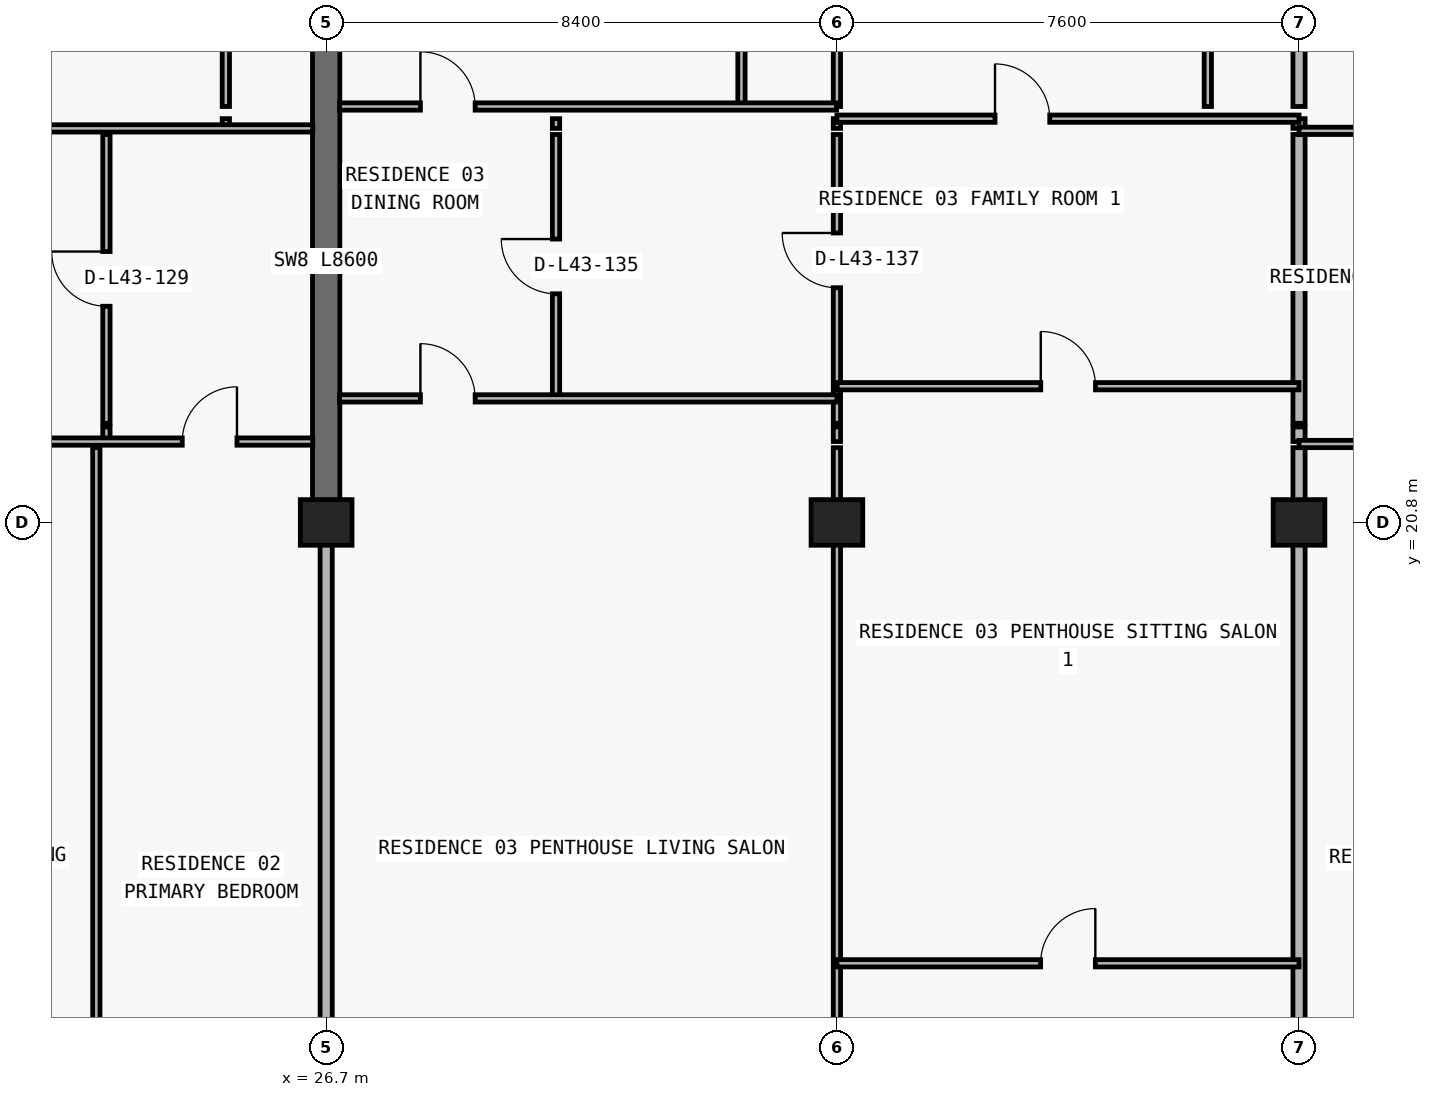
"""IFC4 building model, lengths in metres.
Left out: names, types, materials, properties, quantities, classifications, styles, units other than length and angle.
Written with IfcOpenShell. Run it as: python <this file> out.ifc"""

import sys

from ifc_helpers import new_model, si_unit, direction, frame, frame_2d, origin, origin_2d, place, context, subcontext, project, spatial, rectangle, extrude, element, fill, save


model = new_model("IFC4")
c1 = context("Model", 3, precision=1e-05, world=origin(), true_north=direction((0.0, 1.0)))
c2 = subcontext(c1, "Body", "Model", "MODEL_VIEW")
j1 = project(units=[si_unit("LENGTHUNIT", "METRE"), si_unit("PLANEANGLEUNIT", "RADIAN")], contexts=[c1])
p1 = place(None, origin())
s1 = spatial("IfcSite", under=j1, at=p1, CompositionType="ELEMENT")
p2 = place(p1, origin())
s2 = spatial("IfcBuilding", under=s1, at=p2, CompositionType="ELEMENT")
p3 = place(p2, frame((0.0, 0.0, 157.2)))
s3 = spatial("IfcBuildingStorey", under=s2, at=p3, CompositionType="ELEMENT", Elevation=157.2)
for number, where, z_axis, x_axis in (
    (1, (26.7, 20.8, 0.0), (0.0, 0.0, 1.0), (1.0, 0.0, 0.0)),
    (2, (35.1, 20.8, 0.0), (0.0, 0.0, 1.0), (1.0, 0.0, 0.0)),
    (3, (42.7, 20.8, 0.0), (0.0, 0.0, 1.0), (1.0, 0.0, 0.0)),
):
    element("IfcColumn", number, at=place(p3, frame(where, z_axis=z_axis, x_axis=x_axis)), inside=s3, PredefinedType="COLUMN", context=c2, shape_type="SweptSolid", body=[
        extrude(rectangle(XDim=0.85, YDim=0.75, at=origin_2d()), origin(), (0.0, 0.0, 1.0), 3.05),
    ])
p4 = place(p3, frame((26.7, 20.8, 0.0), z_axis=(0.0, 0.0, 1.0), x_axis=(0.0, 1.0, 0.0)))
e4 = element("IfcWall", 4, at=p4, inside=s3, PredefinedType="SHEAR", context=c2, shape_type="SweptSolid", body=[
    extrude(rectangle(XDim=8.6, YDim=0.45, at=frame_2d((4.3, 0.0))), origin(), (0.0, 0.0, 1.0), 3.05),
])
p5 = place(p3, frame((22.92, 11.24, 0.0), z_axis=(0.0, 0.0, 1.0), x_axis=(0.0, 1.0, 0.0)))
e5 = element("IfcWall", 5, at=p5, inside=s3, PredefinedType="PARTITIONING", context=c2, shape_type="SweptSolid", body=[
    extrude(rectangle(XDim=10.79, YDim=0.12, at=frame_2d((5.395, 0.0))), origin(), (0.0, 0.0, 1.0), 3.05),
])
p6 = place(p3, frame((23.086, 22.13, 0.0), z_axis=(0.0, 0.0, 1.0), x_axis=(0.0, 1.0, 0.0)))
e6 = element("IfcWall", 6, at=p6, inside=s3, PredefinedType="PARTITIONING", context=c2, shape_type="SweptSolid", body=[
    extrude(rectangle(XDim=0.24, YDim=0.12, at=frame_2d((0.12, 0.0))), origin(), (0.0, 0.0, 1.0), 3.05),
])
p7 = place(p3, frame((23.086, 22.43, 0.0), z_axis=(0.0, 0.0, 1.0), x_axis=(0.0, 1.0, 0.0)))
e7 = element("IfcWall", 7, at=p7, inside=s3, PredefinedType="PARTITIONING", context=c2, shape_type="SweptSolid", body=[
    extrude(rectangle(XDim=4.75, YDim=0.12, at=frame_2d((2.375, 0.0))), origin(), (0.0, 0.0, 1.0), 3.05),
])
p8 = place(p7, frame((1.925, 0.0, 0.0)))
e8 = element("IfcOpeningElement", 8, at=p8, cuts=e7, PredefinedType="OPENING", context=c2, shape_type="SweptSolid", body=[
    extrude(rectangle(XDim=0.9, YDim=2.15, at=frame_2d((0.45, 1.075))), frame((0.0, 0.07, 0.0), z_axis=(0.0, -1.0, 0.0), x_axis=(1.0, 0.0, 0.0)), (0.0, 0.0, 1.0), 0.14),
])
p9 = place(p3, frame((25.05, 27.28, 0.0), z_axis=(0.0, 0.0, 1.0), x_axis=(0.0, 1.0, 0.0)))
e9 = element("IfcWall", 9, at=p9, inside=s3, PredefinedType="PARTITIONING", context=c2, shape_type="SweptSolid", body=[
    extrude(rectangle(XDim=0.16, YDim=0.12, at=frame_2d((0.08, 0.0))), origin(), (0.0, 0.0, 1.0), 3.05),
])
p10 = place(p3, frame((25.05, 27.64, 0.0), z_axis=(0.0, 0.0, 1.0), x_axis=(0.0, 1.0, 0.0)))
e10 = element("IfcWall", 10, at=p10, inside=s3, PredefinedType="PARTITIONING", context=c2, shape_type="SweptSolid", body=[
    extrude(rectangle(XDim=6.56, YDim=0.12, at=frame_2d((3.28, 0.0))), origin(), (0.0, 0.0, 1.0), 3.05),
])
p11 = place(p10, frame((2.855, 0.0, 0.0)))
e11 = element("IfcOpeningElement", 11, at=p11, cuts=e10, PredefinedType="OPENING", context=c2, shape_type="SweptSolid", body=[
    extrude(rectangle(XDim=0.85, YDim=2.1, at=frame_2d((0.425, 1.05))), frame((0.0, 0.07, 0.0), z_axis=(0.0, -1.0, 0.0), x_axis=(1.0, 0.0, 0.0)), (0.0, 0.0, 1.0), 0.14),
])
p12 = place(p3, frame((26.7, 11.24, 0.0), z_axis=(0.0, 0.0, 1.0), x_axis=(0.0, 1.0, 0.0)))
e12 = element("IfcWall", 12, at=p12, inside=s3, PredefinedType="PARTITIONING", context=c2, shape_type="SweptSolid", body=[
    extrude(rectangle(XDim=9.555, YDim=0.2, at=frame_2d((4.777, 0.0))), origin(), (0.0, 0.0, 1.0), 2.263),
])
p13 = place(p3, frame((30.48, 22.84, 0.0), z_axis=(0.0, 0.0, 1.0), x_axis=(0.0, 1.0, 0.0)))
e13 = element("IfcWall", 13, at=p13, inside=s3, PredefinedType="PARTITIONING", context=c2, shape_type="SweptSolid", body=[
    extrude(rectangle(XDim=4.34, YDim=0.12, at=frame_2d((2.17, 0.0))), origin(), (0.0, 0.0, 1.0), 3.05),
])
p14 = place(p13, frame((1.72, 0.0, 0.0)))
e14 = element("IfcOpeningElement", 14, at=p14, cuts=e13, PredefinedType="OPENING", context=c2, shape_type="SweptSolid", body=[
    extrude(rectangle(XDim=0.9, YDim=2.15, at=frame_2d((0.45, 1.075))), frame((0.0, 0.07, 0.0), z_axis=(0.0, -1.0, 0.0), x_axis=(1.0, 0.0, 0.0)), (0.0, 0.0, 1.0), 0.14),
])
p15 = place(p3, frame((30.48, 27.28, 0.0), z_axis=(0.0, 0.0, 1.0), x_axis=(0.0, 1.0, 0.0)))
e15 = element("IfcWall", 15, at=p15, inside=s3, PredefinedType="PARTITIONING", context=c2, shape_type="SweptSolid", body=[
    extrude(rectangle(XDim=0.16, YDim=0.12, at=frame_2d((0.08, 0.0))), origin(), (0.0, 0.0, 1.0), 3.05),
])
p16 = place(p3, frame((33.53, 27.64, 0.0), z_axis=(0.0, 0.0, 1.0), x_axis=(0.0, 1.0, 0.0)))
e16 = element("IfcWall", 16, at=p16, inside=s3, PredefinedType="PARTITIONING", context=c2, shape_type="SweptSolid", body=[
    extrude(rectangle(XDim=6.56, YDim=0.12, at=frame_2d((3.28, 0.0))), origin(), (0.0, 0.0, 1.0), 3.05),
])
p17 = place(p16, frame((2.855, 0.0, 0.0)))
e17 = element("IfcOpeningElement", 17, at=p17, cuts=e16, PredefinedType="OPENING", context=c2, shape_type="SweptSolid", body=[
    extrude(rectangle(XDim=0.85, YDim=2.1, at=frame_2d((0.425, 1.05))), frame((0.0, 0.07, 0.0), z_axis=(0.0, -1.0, 0.0), x_axis=(1.0, 0.0, 0.0)), (0.0, 0.0, 1.0), 0.14),
])
p18 = place(p3, frame((35.1, 11.24, 0.0), z_axis=(0.0, 0.0, 1.0), x_axis=(0.0, 1.0, 0.0)))
e18 = element("IfcWall", 18, at=p18, inside=s3, PredefinedType="PARTITIONING", context=c2, shape_type="SweptSolid", body=[
    extrude(rectangle(XDim=10.79, YDim=0.12, at=frame_2d((5.395, 0.0))), origin(), (0.0, 0.0, 1.0), 2.263),
])
p19 = place(p3, frame((35.1, 22.13, 0.0), z_axis=(0.0, 0.0, 1.0), x_axis=(0.0, 1.0, 0.0)))
e19 = element("IfcWall", 19, at=p19, inside=s3, PredefinedType="PARTITIONING", context=c2, shape_type="SweptSolid", body=[
    extrude(rectangle(XDim=0.24, YDim=0.12, at=frame_2d((0.12, 0.0))), origin(), (0.0, 0.0, 1.0), 2.263),
])
p20 = place(p3, frame((35.1, 22.43, 0.0), z_axis=(0.0, 0.0, 1.0), x_axis=(0.0, 1.0, 0.0)))
e20 = element("IfcWall", 20, at=p20, inside=s3, PredefinedType="PARTITIONING", context=c2, shape_type="SweptSolid", body=[
    extrude(rectangle(XDim=4.75, YDim=0.12, at=frame_2d((2.375, 0.0))), origin(), (0.0, 0.0, 1.0), 2.263),
])
p21 = place(p20, frame((2.23, 0.0, 0.0)))
e21 = element("IfcOpeningElement", 21, at=p21, cuts=e20, PredefinedType="OPENING", context=c2, shape_type="SweptSolid", body=[
    extrude(rectangle(XDim=0.9, YDim=2.15, at=frame_2d((0.45, 1.075))), frame((0.0, 0.07, 0.0), z_axis=(0.0, -1.0, 0.0), x_axis=(1.0, 0.0, 0.0)), (0.0, 0.0, 1.0), 0.14),
])
p22 = place(p3, frame((35.1, 27.28, 0.0), z_axis=(0.0, 0.0, 1.0), x_axis=(0.0, 1.0, 0.0)))
e22 = element("IfcWall", 22, at=p22, inside=s3, PredefinedType="PARTITIONING", context=c2, shape_type="SweptSolid", body=[
    extrude(rectangle(XDim=0.16, YDim=0.12, at=frame_2d((0.08, 0.0))), origin(), (0.0, 0.0, 1.0), 2.263),
])
p23 = place(p3, frame((35.1, 27.64, 0.0), z_axis=(0.0, 0.0, 1.0), x_axis=(0.0, 1.0, 0.0)))
e23 = element("IfcWall", 23, at=p23, inside=s3, PredefinedType="PARTITIONING", context=c2, shape_type="SweptSolid", body=[
    extrude(rectangle(XDim=6.56, YDim=0.12, at=frame_2d((3.28, 0.0))), origin(), (0.0, 0.0, 1.0), 2.263),
])
p24 = place(p3, frame((41.2, 27.64, 0.0), z_axis=(0.0, 0.0, 1.0), x_axis=(0.0, 1.0, 0.0)))
e24 = element("IfcWall", 24, at=p24, inside=s3, PredefinedType="PARTITIONING", context=c2, shape_type="SweptSolid", body=[
    extrude(rectangle(XDim=6.56, YDim=0.12, at=frame_2d((3.28, 0.0))), origin(), (0.0, 0.0, 1.0), 3.05),
])
p25 = place(p24, frame((2.855, 0.0, 0.0)))
e25 = element("IfcOpeningElement", 25, at=p25, cuts=e24, PredefinedType="OPENING", context=c2, shape_type="SweptSolid", body=[
    extrude(rectangle(XDim=0.85, YDim=2.1, at=frame_2d((0.425, 1.05))), frame((0.0, 0.07, 0.0), z_axis=(0.0, -1.0, 0.0), x_axis=(1.0, 0.0, 0.0)), (0.0, 0.0, 1.0), 0.14),
])
p26 = place(p3, frame((42.7, 11.24, 0.0), z_axis=(0.0, 0.0, 1.0), x_axis=(0.0, 1.0, 0.0)))
e26 = element("IfcWall", 26, at=p26, inside=s3, PredefinedType="PARTITIONING", context=c2, shape_type="SweptSolid", body=[
    extrude(rectangle(XDim=10.79, YDim=0.2, at=frame_2d((5.395, 0.0))), origin(), (0.0, 0.0, 1.0), 2.263),
])
p27 = place(p3, frame((42.7, 22.13, 0.0), z_axis=(0.0, 0.0, 1.0), x_axis=(0.0, 1.0, 0.0)))
e27 = element("IfcWall", 27, at=p27, inside=s3, PredefinedType="PARTITIONING", context=c2, shape_type="SweptSolid", body=[
    extrude(rectangle(XDim=0.24, YDim=0.2, at=frame_2d((0.12, 0.0))), origin(), (0.0, 0.0, 1.0), 2.263),
])
p28 = place(p3, frame((42.7, 22.43, 0.0), z_axis=(0.0, 0.0, 1.0), x_axis=(0.0, 1.0, 0.0)))
e28 = element("IfcWall", 28, at=p28, inside=s3, PredefinedType="PARTITIONING", context=c2, shape_type="SweptSolid", body=[
    extrude(rectangle(XDim=4.75, YDim=0.2, at=frame_2d((2.375, 0.0))), origin(), (0.0, 0.0, 1.0), 2.263),
])
p29 = place(p3, frame((42.7, 27.28, 0.0), z_axis=(0.0, 0.0, 1.0), x_axis=(0.0, 1.0, 0.0)))
e29 = element("IfcWall", 29, at=p29, inside=s3, PredefinedType="PARTITIONING", context=c2, shape_type="SweptSolid", body=[
    extrude(rectangle(XDim=0.16, YDim=0.2, at=frame_2d((0.08, 0.0))), origin(), (0.0, 0.0, 1.0), 2.263),
])
p30 = place(p3, frame((42.7, 27.64, 0.0), z_axis=(0.0, 0.0, 1.0), x_axis=(0.0, 1.0, 0.0)))
e30 = element("IfcWall", 30, at=p30, inside=s3, PredefinedType="PARTITIONING", context=c2, shape_type="SweptSolid", body=[
    extrude(rectangle(XDim=6.56, YDim=0.2, at=frame_2d((3.28, 0.0))), origin(), (0.0, 0.0, 1.0), 2.263),
])
p31 = place(p3, frame((35.1, 13.55, 0.0), z_axis=(0.0, 0.0, 1.0), x_axis=(1.0, 0.0, 0.0)))
e31 = element("IfcWall", 31, at=p31, inside=s3, PredefinedType="PARTITIONING", context=c2, shape_type="SweptSolid", body=[
    extrude(rectangle(XDim=7.6, YDim=0.12, at=frame_2d((3.8, 0.0))), origin(), (0.0, 0.0, 1.0), 3.05),
])
p32 = place(p31, frame((3.35, 0.0, 0.0)))
e32 = element("IfcOpeningElement", 32, at=p32, cuts=e31, PredefinedType="OPENING", context=c2, shape_type="SweptSolid", body=[
    extrude(rectangle(XDim=0.9, YDim=2.15, at=frame_2d((0.45, 1.075))), frame((0.0, 0.07, 0.0), z_axis=(0.0, -1.0, 0.0), x_axis=(1.0, 0.0, 0.0)), (0.0, 0.0, 1.0), 0.14),
])
p33 = place(p3, frame((42.7, 22.09, 0.0), z_axis=(0.0, 0.0, 1.0), x_axis=(1.0, 0.0, 0.0)))
e33 = element("IfcWall", 33, at=p33, inside=s3, PredefinedType="PARTITIONING", context=c2, shape_type="SweptSolid", body=[
    extrude(rectangle(XDim=8.18, YDim=0.12, at=frame_2d((4.09, 0.0))), origin(), (0.0, 0.0, 1.0), 3.05),
])
p34 = place(p33, frame((1.818, 0.0, 0.0)))
e34 = element("IfcOpeningElement", 34, at=p34, cuts=e33, PredefinedType="OPENING", context=c2, shape_type="SweptSolid", body=[
    extrude(rectangle(XDim=0.9, YDim=2.15, at=frame_2d((0.45, 1.075))), frame((0.0, 0.07, 0.0), z_axis=(0.0, -1.0, 0.0), x_axis=(1.0, 0.0, 0.0)), (0.0, 0.0, 1.0), 0.14),
])
p35 = place(p33, frame((5.95, 0.0, 0.0)))
e35 = element("IfcOpeningElement", 35, at=p35, cuts=e33, PredefinedType="OPENING", context=c2, shape_type="SweptSolid", body=[
    extrude(rectangle(XDim=0.9, YDim=2.15, at=frame_2d((0.45, 1.075))), frame((0.0, 0.07, 0.0), z_axis=(0.0, -1.0, 0.0), x_axis=(1.0, 0.0, 0.0)), (0.0, 0.0, 1.0), 0.14),
])
p36 = place(p3, frame((18.3, 22.13, 0.0), z_axis=(0.0, 0.0, 1.0), x_axis=(1.0, 0.0, 0.0)))
e36 = element("IfcWall", 36, at=p36, inside=s3, PredefinedType="PARTITIONING", context=c2, shape_type="SweptSolid", body=[
    extrude(rectangle(XDim=8.18, YDim=0.12, at=frame_2d((4.09, 0.0))), origin(), (0.0, 0.0, 1.0), 3.05),
])
p37 = place(p36, frame((1.86, 0.0, 0.0)))
e37 = element("IfcOpeningElement", 37, at=p37, cuts=e36, PredefinedType="OPENING", context=c2, shape_type="SweptSolid", body=[
    extrude(rectangle(XDim=0.9, YDim=2.15, at=frame_2d((0.45, 1.075))), frame((0.0, 0.07, 0.0), z_axis=(0.0, -1.0, 0.0), x_axis=(1.0, 0.0, 0.0)), (0.0, 0.0, 1.0), 0.14),
])
p38 = place(p36, frame((6.033, 0.0, 0.0)))
e38 = element("IfcOpeningElement", 38, at=p38, cuts=e36, PredefinedType="OPENING", context=c2, shape_type="SweptSolid", body=[
    extrude(rectangle(XDim=0.9, YDim=2.15, at=frame_2d((0.45, 1.075))), frame((0.0, 0.07, 0.0), z_axis=(0.0, -1.0, 0.0), x_axis=(1.0, 0.0, 0.0)), (0.0, 0.0, 1.0), 0.14),
])
p39 = place(p3, frame((26.92, 22.84, 0.0), z_axis=(0.0, 0.0, 1.0), x_axis=(1.0, 0.0, 0.0)))
e39 = element("IfcWall", 39, at=p39, inside=s3, PredefinedType="PARTITIONING", context=c2, shape_type="SweptSolid", body=[
    extrude(rectangle(XDim=8.18, YDim=0.12, at=frame_2d((4.09, 0.0))), origin(), (0.0, 0.0, 1.0), 3.05),
])
p40 = place(p39, frame((1.33, 0.0, 0.0)))
e40 = element("IfcOpeningElement", 40, at=p40, cuts=e39, PredefinedType="OPENING", context=c2, shape_type="SweptSolid", body=[
    extrude(rectangle(XDim=0.9, YDim=2.15, at=frame_2d((0.45, 1.075))), frame((0.0, 0.07, 0.0), z_axis=(0.0, -1.0, 0.0), x_axis=(1.0, 0.0, 0.0)), (0.0, 0.0, 1.0), 0.14),
])
p41 = place(p3, frame((35.105, 23.04, 0.0), z_axis=(0.0, 0.0, 1.0), x_axis=(1.0, 0.0, 0.0)))
e41 = element("IfcWall", 41, at=p41, inside=s3, PredefinedType="PARTITIONING", context=c2, shape_type="SweptSolid", body=[
    extrude(rectangle(XDim=7.595, YDim=0.12, at=frame_2d((3.797, 0.0))), origin(), (0.0, 0.0, 1.0), 3.05),
])
p42 = place(p41, frame((3.347, 0.0, 0.0)))
e42 = element("IfcOpeningElement", 42, at=p42, cuts=e41, PredefinedType="OPENING", context=c2, shape_type="SweptSolid", body=[
    extrude(rectangle(XDim=0.9, YDim=2.15, at=frame_2d((0.45, 1.075))), frame((0.0, 0.07, 0.0), z_axis=(0.0, -1.0, 0.0), x_axis=(1.0, 0.0, 0.0)), (0.0, 0.0, 1.0), 0.14),
])
p43 = place(p3, frame((42.7, 27.24, 0.0), z_axis=(0.0, 0.0, 1.0), x_axis=(1.0, 0.0, 0.0)))
e43 = element("IfcWall", 43, at=p43, inside=s3, PredefinedType="PARTITIONING", context=c2, shape_type="SweptSolid", body=[
    extrude(rectangle(XDim=8.18, YDim=0.12, at=frame_2d((4.09, 0.0))), origin(), (0.0, 0.0, 1.0), 3.05),
])
p44 = place(p43, frame((1.818, 0.0, 0.0)))
e44 = element("IfcOpeningElement", 44, at=p44, cuts=e43, PredefinedType="OPENING", context=c2, shape_type="SweptSolid", body=[
    extrude(rectangle(XDim=0.9, YDim=2.15, at=frame_2d((0.45, 1.075))), frame((0.0, 0.07, 0.0), z_axis=(0.0, -1.0, 0.0), x_axis=(1.0, 0.0, 0.0)), (0.0, 0.0, 1.0), 0.14),
])
p45 = place(p3, frame((18.3, 27.28, 0.0), z_axis=(0.0, 0.0, 1.0), x_axis=(1.0, 0.0, 0.0)))
e45 = element("IfcWall", 45, at=p45, inside=s3, PredefinedType="PARTITIONING", context=c2, shape_type="SweptSolid", body=[
    extrude(rectangle(XDim=8.18, YDim=0.12, at=frame_2d((4.09, 0.0))), origin(), (0.0, 0.0, 1.0), 3.05),
])
p46 = place(p45, frame((1.943, 0.0, 0.0)))
e46 = element("IfcOpeningElement", 46, at=p46, cuts=e45, PredefinedType="OPENING", context=c2, shape_type="SweptSolid", body=[
    extrude(rectangle(XDim=0.9, YDim=2.15, at=frame_2d((0.45, 1.075))), frame((0.0, 0.07, 0.0), z_axis=(0.0, -1.0, 0.0), x_axis=(1.0, 0.0, 0.0)), (0.0, 0.0, 1.0), 0.14),
])
p47 = place(p3, frame((35.1, 27.44, 0.0), z_axis=(0.0, 0.0, 1.0), x_axis=(1.0, 0.0, 0.0)))
e47 = element("IfcWall", 47, at=p47, inside=s3, PredefinedType="PARTITIONING", context=c2, shape_type="SweptSolid", body=[
    extrude(rectangle(XDim=7.6, YDim=0.12, at=frame_2d((3.8, 0.0))), origin(), (0.0, 0.0, 1.0), 3.05),
])
p48 = place(p47, frame((2.6, 0.0, 0.0)))
e48 = element("IfcOpeningElement", 48, at=p48, cuts=e47, PredefinedType="OPENING", context=c2, shape_type="SweptSolid", body=[
    extrude(rectangle(XDim=0.9, YDim=2.15, at=frame_2d((0.45, 1.075))), frame((0.0, 0.07, 0.0), z_axis=(0.0, -1.0, 0.0), x_axis=(1.0, 0.0, 0.0)), (0.0, 0.0, 1.0), 0.14),
])
p49 = place(p3, frame((26.92, 27.64, 0.0), z_axis=(0.0, 0.0, 1.0), x_axis=(1.0, 0.0, 0.0)))
e49 = element("IfcWall", 49, at=p49, inside=s3, PredefinedType="PARTITIONING", context=c2, shape_type="SweptSolid", body=[
    extrude(rectangle(XDim=8.175, YDim=0.12, at=frame_2d((4.087, 0.0))), origin(), (0.0, 0.0, 1.0), 3.05),
])
p50 = place(p49, frame((1.33, 0.0, 0.0)))
e50 = element("IfcOpeningElement", 50, at=p50, cuts=e49, PredefinedType="OPENING", context=c2, shape_type="SweptSolid", body=[
    extrude(rectangle(XDim=0.9, YDim=2.15, at=frame_2d((0.45, 1.075))), frame((0.0, 0.07, 0.0), z_axis=(0.0, -1.0, 0.0), x_axis=(1.0, 0.0, 0.0)), (0.0, 0.0, 1.0), 0.14),
])
p51 = place(p8, origin())
e51 = element("IfcDoor", 51, at=p51, inside=s3, OperationType="SINGLE_SWING_RIGHT", PredefinedType="DOOR", context=c2, shape_type="SweptSolid", body=[
    extrude(rectangle(XDim=0.9, YDim=2.15, at=frame_2d((0.45, 1.075))), frame((0.0, 0.025, 0.0), z_axis=(0.0, -1.0, 0.0), x_axis=(1.0, 0.0, 0.0)), (0.0, 0.0, 1.0), 0.05),
])
fill(e8, e51)
p52 = place(p38, origin())
e52 = element("IfcDoor", 52, at=p52, inside=s3, OperationType="SINGLE_SWING_RIGHT", PredefinedType="DOOR", context=c2, shape_type="SweptSolid", body=[
    extrude(rectangle(XDim=0.9, YDim=2.15, at=frame_2d((0.45, 1.075))), frame((0.0, 0.025, 0.0), z_axis=(0.0, -1.0, 0.0), x_axis=(1.0, 0.0, 0.0)), (0.0, 0.0, 1.0), 0.05),
])
fill(e38, e52)
p53 = place(p50, origin())
e53 = element("IfcDoor", 53, at=p53, inside=s3, OperationType="SINGLE_SWING_LEFT", PredefinedType="DOOR", context=c2, shape_type="SweptSolid", body=[
    extrude(rectangle(XDim=0.9, YDim=2.15, at=frame_2d((0.45, 1.075))), frame((0.0, 0.025, 0.0), z_axis=(0.0, -1.0, 0.0), x_axis=(1.0, 0.0, 0.0)), (0.0, 0.0, 1.0), 0.05),
])
fill(e50, e53)
p54 = place(p14, origin())
e54 = element("IfcDoor", 54, at=p54, inside=s3, OperationType="SINGLE_SWING_RIGHT", PredefinedType="DOOR", context=c2, shape_type="SweptSolid", body=[
    extrude(rectangle(XDim=0.9, YDim=2.15, at=frame_2d((0.45, 1.075))), frame((0.0, 0.025, 0.0), z_axis=(0.0, -1.0, 0.0), x_axis=(1.0, 0.0, 0.0)), (0.0, 0.0, 1.0), 0.05),
])
fill(e14, e54)
p55 = place(p40, origin())
e55 = element("IfcDoor", 55, at=p55, inside=s3, OperationType="SINGLE_SWING_LEFT", PredefinedType="DOOR", context=c2, shape_type="SweptSolid", body=[
    extrude(rectangle(XDim=0.9, YDim=2.15, at=frame_2d((0.45, 1.075))), frame((0.0, 0.025, 0.0), z_axis=(0.0, -1.0, 0.0), x_axis=(1.0, 0.0, 0.0)), (0.0, 0.0, 1.0), 0.05),
])
fill(e40, e55)
p56 = place(p21, origin())
e56 = element("IfcDoor", 56, at=p56, inside=s3, OperationType="SINGLE_SWING_RIGHT", PredefinedType="DOOR", context=c2, shape_type="SweptSolid", body=[
    extrude(rectangle(XDim=0.9, YDim=2.15, at=frame_2d((0.45, 1.075))), frame((0.0, 0.025, 0.0), z_axis=(0.0, -1.0, 0.0), x_axis=(1.0, 0.0, 0.0)), (0.0, 0.0, 1.0), 0.05),
])
fill(e21, e56)
p57 = place(p48, origin())
e57 = element("IfcDoor", 57, at=p57, inside=s3, OperationType="SINGLE_SWING_LEFT", PredefinedType="DOOR", context=c2, shape_type="SweptSolid", body=[
    extrude(rectangle(XDim=0.9, YDim=2.15, at=frame_2d((0.45, 1.075))), frame((0.0, 0.025, 0.0), z_axis=(0.0, -1.0, 0.0), x_axis=(1.0, 0.0, 0.0)), (0.0, 0.0, 1.0), 0.05),
])
fill(e48, e57)
p58 = place(p42, origin())
e58 = element("IfcDoor", 58, at=p58, inside=s3, OperationType="SINGLE_SWING_LEFT", PredefinedType="DOOR", context=c2, shape_type="SweptSolid", body=[
    extrude(rectangle(XDim=0.9, YDim=2.15, at=frame_2d((0.45, 1.075))), frame((0.0, 0.025, 0.0), z_axis=(0.0, -1.0, 0.0), x_axis=(1.0, 0.0, 0.0)), (0.0, 0.0, 1.0), 0.05),
])
fill(e42, e58)
p59 = place(p32, origin())
e59 = element("IfcDoor", 59, at=p59, inside=s3, OperationType="SINGLE_SWING_RIGHT", PredefinedType="DOOR", context=c2, shape_type="SweptSolid", body=[
    extrude(rectangle(XDim=0.9, YDim=2.15, at=frame_2d((0.45, 1.075))), frame((0.0, 0.025, 0.0), z_axis=(0.0, -1.0, 0.0), x_axis=(1.0, 0.0, 0.0)), (0.0, 0.0, 1.0), 0.05),
])
fill(e32, e59)
save(model, sys.argv[1])
